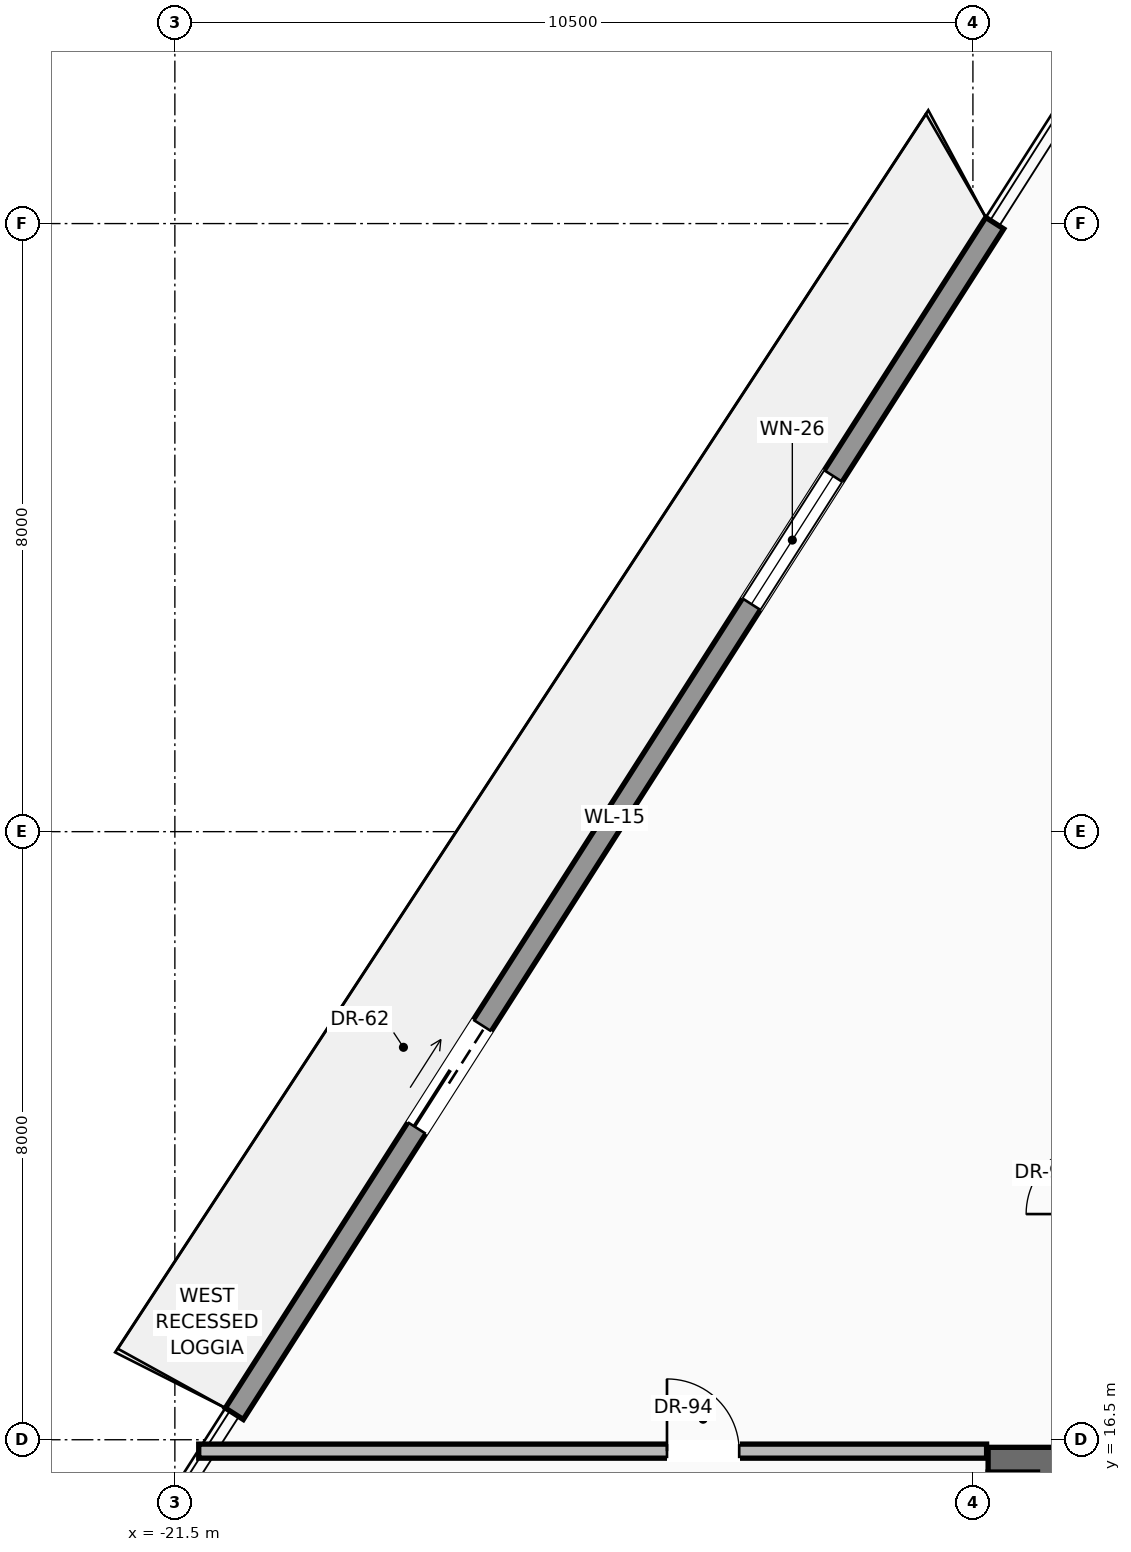
"""IFC4 building model, lengths in metres.
Left out: names, types, materials, properties, quantities, classifications, styles, units other than length and angle.
Written with IfcOpenShell. Run it as: python <this file> out.ifc"""

import sys

from ifc_helpers import new_model, si_unit, direction, frame, frame_2d, origin, place, context, subcontext, project, spatial, rectangle, extrude, source, transform, mapped, element, fill, save


model = new_model("IFC4")
c1 = context("Model", 3, precision=1e-05, world=origin(), true_north=direction((0.0, 1.0)))
c2 = subcontext(c1, "Body", "Model", "MODEL_VIEW")
j1 = project(units=[si_unit("LENGTHUNIT", "METRE"), si_unit("PLANEANGLEUNIT", "RADIAN")], contexts=[c1])
p1 = place(None, origin())
s1 = spatial("IfcSite", under=j1, at=p1, CompositionType="ELEMENT")
p2 = place(p1, origin())
s2 = spatial("IfcBuilding", under=s1, at=p2, CompositionType="ELEMENT")
p3 = place(p2, frame((0.0, 0.0, 158.9)))
s3 = spatial("IfcBuildingStorey", under=s2, at=p3, CompositionType="ELEMENT", Elevation=158.9)
p4 = place(p3, frame((-10.8, 16.075, 0.0), z_axis=(0.0, 0.0, 1.0), x_axis=(1.0, 0.0, 0.0)))
e1 = element("IfcWall", 1, at=p4, inside=s3, PredefinedType="SHEAR", context=c2, shape_type="SweptSolid", body=[
    extrude(rectangle(XDim=21.6, YDim=0.65, at=frame_2d((10.8, 0.0))), origin(), (0.0, 0.0, 1.0), 3.47),
])
p5 = place(p4, frame((3.37, 0.0, 0.0)))
e2 = element("IfcOpeningElement", 2, at=p5, cuts=e1, PredefinedType="OPENING", context=c2, shape_type="SweptSolid", body=[
    extrude(rectangle(XDim=1.3, YDim=2.3, at=frame_2d((0.65, 1.15))), frame((0.0, 0.335, 0.0), z_axis=(0.0, -1.0, 0.0), x_axis=(1.0, 0.0, 0.0)), (0.0, 0.0, 1.0), 0.67),
])
p6 = place(p4, frame((9.8, 0.0, 0.0)))
e3 = element("IfcOpeningElement", 3, at=p6, cuts=e1, PredefinedType="OPENING", context=c2, shape_type="SweptSolid", body=[
    extrude(rectangle(XDim=2.0, YDim=2.4, at=frame_2d((1.0, 1.2))), frame((0.0, 0.335, 0.0), z_axis=(0.0, -1.0, 0.0), x_axis=(1.0, 0.0, 0.0)), (0.0, 0.0, 1.0), 0.67),
])
p7 = place(p3, frame((-10.475, 0.525, 0.0), z_axis=(0.0, 0.0, 1.0), x_axis=(0.0, 1.0, 0.0)))
e4 = element("IfcWall", 4, at=p7, inside=s3, PredefinedType="SHEAR", context=c2, shape_type="SweptSolid", body=[
    extrude(rectangle(XDim=15.55, YDim=0.65, at=frame_2d((7.775, 0.0))), origin(), (0.0, 0.0, 1.0), 3.47),
])
p8 = place(p3, frame((-20.718, 16.842, 0.0), z_axis=(0.0, 0.0, 1.0), x_axis=(0.538291588768, 0.842758663831, 0.0)))
e5 = element("IfcWall", 5, at=p8, inside=s3, PredefinedType="SOLIDWALL", context=c2, shape_type="SweptSolid", body=[
    extrude(rectangle(XDim=18.586, YDim=0.28, at=frame_2d((9.293, 0.0))), origin(), (0.0, 0.0, 1.0), 3.05),
])
p9 = place(p8, frame((4.461, 0.0, 0.0)))
e6 = element("IfcOpeningElement", 6, at=p9, cuts=e5, PredefinedType="OPENING", context=c2, shape_type="SweptSolid", body=[
    extrude(rectangle(XDim=1.6, YDim=2.35, at=frame_2d((0.8, 1.175))), frame((0.0, 0.15, 0.0), z_axis=(0.0, -1.0, 0.0), x_axis=(1.0, 0.0, 0.0)), (0.0, 0.0, 1.0), 0.3),
])
p10 = place(p8, frame((12.639, 0.0, 0.9)))
e7 = element("IfcOpeningElement", 7, at=p10, cuts=e5, PredefinedType="OPENING", context=c2, shape_type="SweptSolid", body=[
    extrude(rectangle(XDim=2.0, YDim=1.85, at=frame_2d((1.0, 0.925))), frame((0.0, 0.15, 0.0), z_axis=(0.0, -1.0, 0.0), x_axis=(1.0, 0.0, 0.0)), (0.0, 0.0, 1.0), 0.3),
])
p11 = place(p3, frame((-21.186, 16.35, 0.0), z_axis=(0.0, 0.0, 1.0), x_axis=(1.0, 0.0, 0.0)))
e8 = element("IfcWall", 8, at=p11, inside=s3, PredefinedType="PARTITIONING", context=c2, shape_type="SweptSolid", body=[
    extrude(rectangle(XDim=10.366, YDim=0.185, at=frame_2d((5.183, 0.0))), origin(), (0.0, 0.0, 1.0), 3.462),
])
p12 = place(p11, frame((6.161, 0.0, 0.0)))
e9 = element("IfcOpeningElement", 9, at=p12, cuts=e8, PredefinedType="OPENING", context=c2, shape_type="SweptSolid", body=[
    extrude(rectangle(XDim=0.95, YDim=2.2, at=frame_2d((0.475, 1.1))), frame((0.0, 0.103, 0.0), z_axis=(0.0, -1.0, 0.0), x_axis=(1.0, 0.0, 0.0)), (0.0, 0.0, 1.0), 0.205),
])
m1 = source(origin(), c2, "Body", "SweptSolid", [
    extrude(rectangle(XDim=1.6, YDim=2.35, at=frame_2d((0.8, 1.175))), frame((0.0, 0.025, 0.0), z_axis=(0.0, -1.0, 0.0), x_axis=(1.0, 0.0, 0.0)), (0.0, 0.0, 1.0), 0.05),
])
p13 = place(p9, origin())
e10 = element("IfcDoor", 10, at=p13, inside=s3, OperationType="SLIDING_TO_LEFT", PredefinedType="DOOR", context=c2, shape_type="MappedRepresentation", body=[
    mapped(m1, transform((0.0, 0.0, 0.0), scale=1.0)),
])
fill(e6, e10)
m2 = source(origin(), c2, "Body", "SweptSolid", [
    extrude(rectangle(XDim=2.0, YDim=1.85, at=frame_2d((1.0, 0.925))), frame((0.0, 0.03, 0.0), z_axis=(0.0, -1.0, 0.0), x_axis=(1.0, 0.0, 0.0)), (0.0, 0.0, 1.0), 0.06),
])
p14 = place(p10, origin())
e11 = element("IfcWindow", 11, at=p14, inside=s3, PartitioningType="SINGLE_PANEL", PredefinedType="WINDOW", context=c2, shape_type="MappedRepresentation", body=[
    mapped(m2, transform((0.0, 0.0, 0.0), scale=1.0)),
])
fill(e7, e11)
m3 = source(origin(), c2, "Body", "SweptSolid", [
    extrude(rectangle(XDim=0.95, YDim=2.2, at=frame_2d((0.475, 1.1))), frame((0.0, 0.025, 0.0), z_axis=(0.0, -1.0, 0.0), x_axis=(1.0, 0.0, 0.0)), (0.0, 0.0, 1.0), 0.05),
])
p15 = place(p12, origin())
e12 = element("IfcDoor", 12, at=p15, inside=s3, OperationType="SINGLE_SWING_LEFT", PredefinedType="DOOR", context=c2, shape_type="MappedRepresentation", body=[
    mapped(m3, transform((0.0, 0.0, 0.0), scale=1.0)),
])
fill(e9, e12)
save(model, sys.argv[1])
